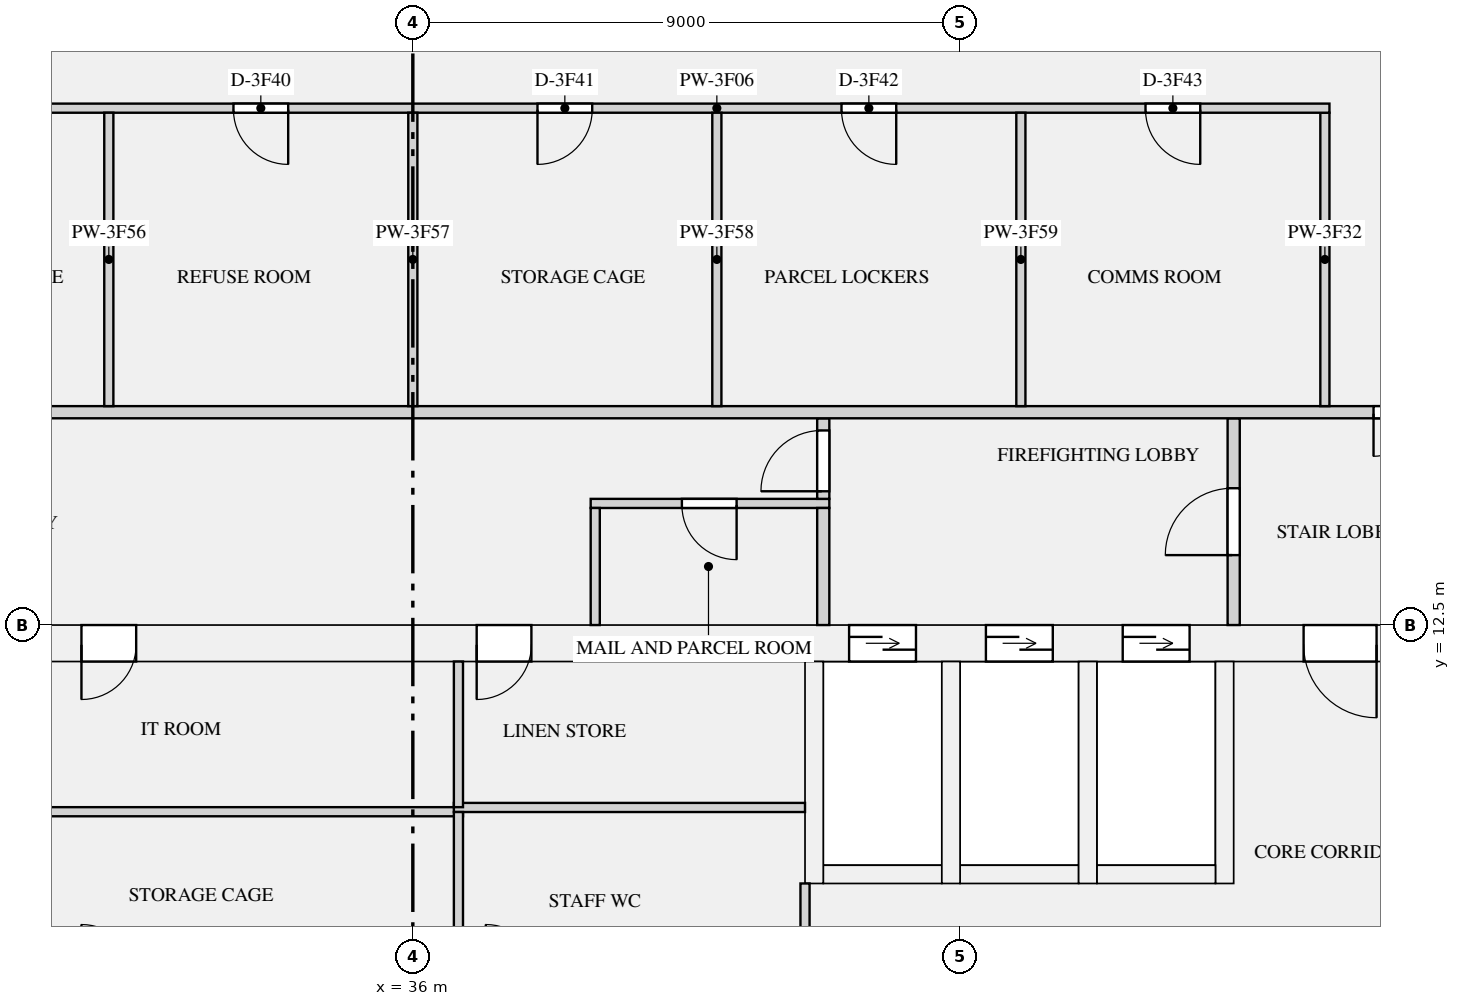
"""IFC4 building model, lengths in metres.
Left out: names, types, materials, properties, quantities, classifications, styles, units other than length and angle.
Written with IfcOpenShell. Run it as: python <this file> out.ifc"""

import sys

from ifc_helpers import new_model, si_unit, direction, frame, frame_2d, origin, place, context, subcontext, project, spatial, rectangle, extrude, element, fill, save


model = new_model("IFC4")
c1 = context("Model", 3, precision=1e-05, world=origin(), true_north=direction((0.0, 1.0)))
c2 = subcontext(c1, "Body", "Model", "MODEL_VIEW")
j1 = project(units=[si_unit("LENGTHUNIT", "METRE"), si_unit("PLANEANGLEUNIT", "RADIAN")], contexts=[c1])
p1 = place(None, origin())
s1 = spatial("IfcSite", under=j1, at=p1, CompositionType="ELEMENT")
p2 = place(p1, origin())
s2 = spatial("IfcBuilding", under=s1, at=p2, CompositionType="ELEMENT")
p3 = place(p2, frame((0.0, 0.0, 179.1)))
s3 = spatial("IfcBuildingStorey", under=s2, at=p3, CompositionType="ELEMENT", Elevation=179.1)
p4 = place(p3, frame((18.7, 12.2, 0.0), z_axis=(0.0, 0.0, 1.0), x_axis=(1.0, 0.0, 0.0)))
e1 = element("IfcWall", 1, at=p4, inside=s3, PredefinedType="SHEAR", context=c2, shape_type="SweptSolid", body=[
    extrude(rectangle(XDim=34.6, YDim=0.6, at=frame_2d((17.3, 0.0))), origin(), (0.0, 0.0, 1.0), 3.15),
])
p5 = place(p4, frame((24.475, 0.0, 0.0)))
e2 = element("IfcOpeningElement", 2, at=p5, cuts=e1, PredefinedType="OPENING", context=c2, shape_type="SweptSolid", body=[
    extrude(rectangle(XDim=1.1, YDim=2.1, at=frame_2d((0.55, 1.05))), frame((0.0, 0.31, 0.0), z_axis=(0.0, -1.0, 0.0), x_axis=(1.0, 0.0, 0.0)), (0.0, 0.0, 1.0), 0.62),
])
p6 = place(p4, frame((26.725, 0.0, 0.0)))
e3 = element("IfcOpeningElement", 3, at=p6, cuts=e1, PredefinedType="OPENING", context=c2, shape_type="SweptSolid", body=[
    extrude(rectangle(XDim=1.1, YDim=2.1, at=frame_2d((0.55, 1.05))), frame((0.0, 0.31, 0.0), z_axis=(0.0, -1.0, 0.0), x_axis=(1.0, 0.0, 0.0)), (0.0, 0.0, 1.0), 0.62),
])
p7 = place(p4, frame((28.975, 0.0, 0.0)))
e4 = element("IfcOpeningElement", 4, at=p7, cuts=e1, PredefinedType="OPENING", context=c2, shape_type="SweptSolid", body=[
    extrude(rectangle(XDim=1.1, YDim=2.1, at=frame_2d((0.55, 1.05))), frame((0.0, 0.31, 0.0), z_axis=(0.0, -1.0, 0.0), x_axis=(1.0, 0.0, 0.0)), (0.0, 0.0, 1.0), 0.62),
])
p8 = place(p4, frame((4.85, 0.0, 0.0)))
e5 = element("IfcOpeningElement", 5, at=p8, cuts=e1, PredefinedType="OPENING", context=c2, shape_type="SweptSolid", body=[
    extrude(rectangle(XDim=0.9, YDim=2.1, at=frame_2d((0.45, 1.05))), frame((0.0, 0.31, 0.0), z_axis=(0.0, -1.0, 0.0), x_axis=(1.0, 0.0, 0.0)), (0.0, 0.0, 1.0), 0.62),
])
p9 = place(p4, frame((11.85, 0.0, 0.0)))
e6 = element("IfcOpeningElement", 6, at=p9, cuts=e1, PredefinedType="OPENING", context=c2, shape_type="SweptSolid", body=[
    extrude(rectangle(XDim=0.9, YDim=2.1, at=frame_2d((0.45, 1.05))), frame((0.0, 0.31, 0.0), z_axis=(0.0, -1.0, 0.0), x_axis=(1.0, 0.0, 0.0)), (0.0, 0.0, 1.0), 0.62),
])
p10 = place(p4, frame((18.35, 0.0, 0.0)))
e7 = element("IfcOpeningElement", 7, at=p10, cuts=e1, PredefinedType="OPENING", context=c2, shape_type="SweptSolid", body=[
    extrude(rectangle(XDim=0.9, YDim=2.1, at=frame_2d((0.45, 1.05))), frame((0.0, 0.31, 0.0), z_axis=(0.0, -1.0, 0.0), x_axis=(1.0, 0.0, 0.0)), (0.0, 0.0, 1.0), 0.62),
])
p11 = place(p4, frame((1.45, 0.0, 0.0)))
e8 = element("IfcOpeningElement", 8, at=p11, cuts=e1, PredefinedType="OPENING", context=c2, shape_type="SweptSolid", body=[
    extrude(rectangle(XDim=1.2, YDim=2.1, at=frame_2d((0.6, 1.05))), frame((0.0, 0.31, 0.0), z_axis=(0.0, -1.0, 0.0), x_axis=(1.0, 0.0, 0.0)), (0.0, 0.0, 1.0), 0.62),
])
p12 = place(p4, frame((31.95, 0.0, 0.0)))
e9 = element("IfcOpeningElement", 9, at=p12, cuts=e1, PredefinedType="OPENING", context=c2, shape_type="SweptSolid", body=[
    extrude(rectangle(XDim=1.2, YDim=2.1, at=frame_2d((0.6, 1.05))), frame((0.0, 0.31, 0.0), z_axis=(0.0, -1.0, 0.0), x_axis=(1.0, 0.0, 0.0)), (0.0, 0.0, 1.0), 0.62),
])
p13 = place(p3, frame((42.75, 8.4, 0.0), z_axis=(0.0, 0.0, 1.0), x_axis=(1.0, 0.0, 0.0)))
e10 = element("IfcWall", 10, at=p13, inside=s3, PredefinedType="SHEAR", context=c2, shape_type="SweptSolid", body=[
    extrude(rectangle(XDim=1.95, YDim=0.3, at=frame_2d((0.975, 0.0))), origin(), (0.0, 0.0, 1.0), 3.15),
])
p14 = place(p3, frame((42.6, 8.25, 0.0), z_axis=(0.0, 0.0, 1.0), x_axis=(0.0, 1.0, 0.0)))
e11 = element("IfcWall", 11, at=p14, inside=s3, PredefinedType="SHEAR", context=c2, shape_type="SweptSolid", body=[
    extrude(rectangle(XDim=3.65, YDim=0.3, at=frame_2d((1.825, 0.0))), origin(), (0.0, 0.0, 1.0), 3.15),
])
p15 = place(p3, frame((45.0, 8.4, 0.0), z_axis=(0.0, 0.0, 1.0), x_axis=(1.0, 0.0, 0.0)))
e12 = element("IfcWall", 12, at=p15, inside=s3, PredefinedType="SHEAR", context=c2, shape_type="SweptSolid", body=[
    extrude(rectangle(XDim=1.95, YDim=0.3, at=frame_2d((0.975, 0.0))), origin(), (0.0, 0.0, 1.0), 3.15),
])
p16 = place(p3, frame((44.85, 8.25, 0.0), z_axis=(0.0, 0.0, 1.0), x_axis=(0.0, 1.0, 0.0)))
e13 = element("IfcWall", 13, at=p16, inside=s3, PredefinedType="SHEAR", context=c2, shape_type="SweptSolid", body=[
    extrude(rectangle(XDim=3.65, YDim=0.3, at=frame_2d((1.825, 0.0))), origin(), (0.0, 0.0, 1.0), 3.15),
])
p17 = place(p3, frame((47.25, 8.4, 0.0), z_axis=(0.0, 0.0, 1.0), x_axis=(1.0, 0.0, 0.0)))
e14 = element("IfcWall", 14, at=p17, inside=s3, PredefinedType="SHEAR", context=c2, shape_type="SweptSolid", body=[
    extrude(rectangle(XDim=1.95, YDim=0.3, at=frame_2d((0.975, 0.0))), origin(), (0.0, 0.0, 1.0), 3.15),
])
for number, where, z_axis, x_axis in (
    (15, (47.1, 8.25, 0.0), (0.0, 0.0, 1.0), (0.0, 1.0, 0.0)),
    (16, (49.35, 8.25, 0.0), (0.0, 0.0, 1.0), (0.0, 1.0, 0.0)),
):
    element("IfcWall", number, at=place(p3, frame(where, z_axis=z_axis, x_axis=x_axis)), inside=s3, PredefinedType="SHEAR", context=c2, shape_type="SweptSolid", body=[
        extrude(rectangle(XDim=3.65, YDim=0.3, at=frame_2d((1.825, 0.0))), origin(), (0.0, 0.0, 1.0), 3.15),
    ])
p18 = place(p3, frame((22.725, 9.43, 0.0), z_axis=(0.0, 0.0, 1.0), x_axis=(1.0, 0.0, 0.0)))
e17 = element("IfcWall", 17, at=p18, inside=s3, PredefinedType="PARTITIONING", context=c2, shape_type="SweptSolid", body=[
    extrude(rectangle(XDim=14.1, YDim=0.15, at=frame_2d((7.05, 0.0))), origin(), (0.0, 0.0, 1.0), 2.83),
])
p19 = place(p3, frame((36.675, 9.5, 0.0), z_axis=(0.0, 0.0, 1.0), x_axis=(1.0, 0.0, 0.0)))
e18 = element("IfcWall", 18, at=p19, inside=s3, PredefinedType="PARTITIONING", context=c2, shape_type="SweptSolid", body=[
    extrude(rectangle(XDim=5.775, YDim=0.15, at=frame_2d((2.887, 0.0))), origin(), (0.0, 0.0, 1.0), 2.83),
])
p20 = place(p3, frame((38.925, 14.5, 0.0), z_axis=(0.0, 0.0, 1.0), x_axis=(1.0, 0.0, 0.0)))
e19 = element("IfcWall", 19, at=p20, inside=s3, PredefinedType="PARTITIONING", context=c2, shape_type="SweptSolid", body=[
    extrude(rectangle(XDim=3.925, YDim=0.15, at=frame_2d((1.962, 0.0))), origin(), (0.0, 0.0, 1.0), 2.83),
])
p21 = place(p20, frame((1.5, 0.0, 0.0)))
e20 = element("IfcOpeningElement", 20, at=p21, cuts=e19, PredefinedType="OPENING", context=c2, shape_type="SweptSolid", body=[
    extrude(rectangle(XDim=0.9, YDim=2.1, at=frame_2d((0.45, 1.05))), frame((0.0, 0.085, 0.0), z_axis=(0.0, -1.0, 0.0), x_axis=(1.0, 0.0, 0.0)), (0.0, 0.0, 1.0), 0.17),
])
p22 = place(p3, frame((42.45, 6.65, 0.0), z_axis=(0.0, 0.0, 1.0), x_axis=(0.0, 1.0, 0.0)))
e21 = element("IfcWall", 21, at=p22, inside=s3, PredefinedType="PARTITIONING", context=c2, shape_type="SweptSolid", body=[
    extrude(rectangle(XDim=1.6, YDim=0.15, at=frame_2d((0.8, 0.0))), origin(), (0.0, 0.0, 1.0), 2.83),
])
p23 = place(p3, frame((36.75, 6.725, 0.0), z_axis=(0.0, 0.0, 1.0), x_axis=(0.0, 1.0, 0.0)))
e22 = element("IfcWall", 22, at=p23, inside=s3, PredefinedType="PARTITIONING", context=c2, shape_type="SweptSolid", body=[
    extrude(rectangle(XDim=2.7, YDim=0.15, at=frame_2d((1.35, 0.0))), origin(), (0.0, 0.0, 1.0), 2.83),
])
p24 = place(p3, frame((36.75, 9.505, 0.0), z_axis=(0.0, 0.0, 1.0), x_axis=(0.0, 1.0, 0.0)))
e23 = element("IfcWall", 23, at=p24, inside=s3, PredefinedType="PARTITIONING", context=c2, shape_type="SweptSolid", body=[
    extrude(rectangle(XDim=2.395, YDim=0.15, at=frame_2d((1.198, 0.0))), origin(), (0.0, 0.0, 1.0), 2.83),
])
p25 = place(p3, frame((39.0, 12.5, 0.0), z_axis=(0.0, 0.0, 1.0), x_axis=(0.0, 1.0, 0.0)))
e24 = element("IfcWall", 24, at=p25, inside=s3, PredefinedType="PARTITIONING", context=c2, shape_type="SweptSolid", body=[
    extrude(rectangle(XDim=1.925, YDim=0.15, at=frame_2d((0.962, 0.0))), origin(), (0.0, 0.0, 1.0), 2.83),
])
p26 = place(p3, frame((42.75, 12.5, 0.0), z_axis=(0.0, 0.0, 1.0), x_axis=(0.0, 1.0, 0.0)))
e25 = element("IfcWall", 25, at=p26, inside=s3, PredefinedType="PARTITIONING", context=c2, shape_type="SweptSolid", body=[
    extrude(rectangle(XDim=1.925, YDim=0.2, at=frame_2d((0.962, 0.0))), origin(), (0.0, 0.0, 1.0), 2.83),
])
p27 = place(p3, frame((49.5, 12.5, 0.0), z_axis=(0.0, 0.0, 1.0), x_axis=(0.0, 1.0, 0.0)))
e26 = element("IfcWall", 26, at=p27, inside=s3, PredefinedType="PARTITIONING", context=c2, shape_type="SweptSolid", body=[
    extrude(rectangle(XDim=3.4, YDim=0.2, at=frame_2d((1.7, 0.0))), origin(), (0.0, 0.0, 1.0), 2.83),
])
p28 = place(p27, frame((1.15, 0.0, 0.0)))
e27 = element("IfcOpeningElement", 27, at=p28, cuts=e26, PredefinedType="OPENING", context=c2, shape_type="SweptSolid", body=[
    extrude(rectangle(XDim=1.1, YDim=2.1, at=frame_2d((0.55, 1.05))), frame((0.0, 0.11, 0.0), z_axis=(0.0, -1.0, 0.0), x_axis=(1.0, 0.0, 0.0)), (0.0, 0.0, 1.0), 0.22),
])
p29 = place(p3, frame((42.75, 14.575, 0.0), z_axis=(0.0, 0.0, 1.0), x_axis=(0.0, 1.0, 0.0)))
e28 = element("IfcWall", 28, at=p29, inside=s3, PredefinedType="PARTITIONING", context=c2, shape_type="SweptSolid", body=[
    extrude(rectangle(XDim=1.325, YDim=0.2, at=frame_2d((0.663, 0.0))), origin(), (0.0, 0.0, 1.0), 2.83),
])
p30 = place(p29, frame((0.125, 0.0, 0.0)))
e29 = element("IfcOpeningElement", 29, at=p30, cuts=e28, PredefinedType="OPENING", context=c2, shape_type="SweptSolid", body=[
    extrude(rectangle(XDim=1.0, YDim=2.1, at=frame_2d((0.5, 1.05))), frame((0.0, 0.11, 0.0), z_axis=(0.0, -1.0, 0.0), x_axis=(1.0, 0.0, 0.0)), (0.0, 0.0, 1.0), 0.22),
])
p31 = place(p3, frame((20.925, 21.0, 0.0), z_axis=(0.0, 0.0, 1.0), x_axis=(1.0, 0.0, 0.0)))
e30 = element("IfcWall", 30, at=p31, inside=s3, PredefinedType="PARTITIONING", context=c2, shape_type="SweptSolid", body=[
    extrude(rectangle(XDim=30.15, YDim=0.15, at=frame_2d((15.075, 0.0))), origin(), (0.0, 0.0, 1.0), 2.83),
])
p32 = place(p31, frame((2.125, 0.0, 0.0)))
e31 = element("IfcOpeningElement", 31, at=p32, cuts=e30, PredefinedType="OPENING", context=c2, shape_type="SweptSolid", body=[
    extrude(rectangle(XDim=0.9, YDim=2.1, at=frame_2d((0.45, 1.05))), frame((0.0, 0.085, 0.0), z_axis=(0.0, -1.0, 0.0), x_axis=(1.0, 0.0, 0.0)), (0.0, 0.0, 1.0), 0.17),
])
p33 = place(p31, frame((7.125, 0.0, 0.0)))
e32 = element("IfcOpeningElement", 32, at=p33, cuts=e30, PredefinedType="OPENING", context=c2, shape_type="SweptSolid", body=[
    extrude(rectangle(XDim=0.9, YDim=2.1, at=frame_2d((0.45, 1.05))), frame((0.0, 0.085, 0.0), z_axis=(0.0, -1.0, 0.0), x_axis=(1.0, 0.0, 0.0)), (0.0, 0.0, 1.0), 0.17),
])
p34 = place(p31, frame((12.125, 0.0, 0.0)))
e33 = element("IfcOpeningElement", 33, at=p34, cuts=e30, PredefinedType="OPENING", context=c2, shape_type="SweptSolid", body=[
    extrude(rectangle(XDim=0.9, YDim=2.1, at=frame_2d((0.45, 1.05))), frame((0.0, 0.085, 0.0), z_axis=(0.0, -1.0, 0.0), x_axis=(1.0, 0.0, 0.0)), (0.0, 0.0, 1.0), 0.17),
])
p35 = place(p31, frame((17.125, 0.0, 0.0)))
e34 = element("IfcOpeningElement", 34, at=p35, cuts=e30, PredefinedType="OPENING", context=c2, shape_type="SweptSolid", body=[
    extrude(rectangle(XDim=0.9, YDim=2.1, at=frame_2d((0.45, 1.05))), frame((0.0, 0.085, 0.0), z_axis=(0.0, -1.0, 0.0), x_axis=(1.0, 0.0, 0.0)), (0.0, 0.0, 1.0), 0.17),
])
p36 = place(p31, frame((22.125, 0.0, 0.0)))
e35 = element("IfcOpeningElement", 35, at=p36, cuts=e30, PredefinedType="OPENING", context=c2, shape_type="SweptSolid", body=[
    extrude(rectangle(XDim=0.9, YDim=2.1, at=frame_2d((0.45, 1.05))), frame((0.0, 0.085, 0.0), z_axis=(0.0, -1.0, 0.0), x_axis=(1.0, 0.0, 0.0)), (0.0, 0.0, 1.0), 0.17),
])
p37 = place(p31, frame((27.125, 0.0, 0.0)))
e36 = element("IfcOpeningElement", 36, at=p37, cuts=e30, PredefinedType="OPENING", context=c2, shape_type="SweptSolid", body=[
    extrude(rectangle(XDim=0.9, YDim=2.1, at=frame_2d((0.45, 1.05))), frame((0.0, 0.085, 0.0), z_axis=(0.0, -1.0, 0.0), x_axis=(1.0, 0.0, 0.0)), (0.0, 0.0, 1.0), 0.17),
])
p38 = place(p3, frame((17.9, 16.0, 0.0), z_axis=(0.0, 0.0, 1.0), x_axis=(1.0, 0.0, 0.0)))
e37 = element("IfcWall", 37, at=p38, inside=s3, PredefinedType="PARTITIONING", context=c2, shape_type="SweptSolid", body=[
    extrude(rectangle(XDim=36.2, YDim=0.2, at=frame_2d((18.1, 0.0))), origin(), (0.0, 0.0, 1.0), 2.83),
])
p39 = place(p38, frame((0.9, 0.0, 0.0)))
e38 = element("IfcOpeningElement", 38, at=p39, cuts=e37, PredefinedType="OPENING", context=c2, shape_type="SweptSolid", body=[
    extrude(rectangle(XDim=1.4, YDim=2.1, at=frame_2d((0.7, 1.05))), frame((0.0, 0.11, 0.0), z_axis=(0.0, -1.0, 0.0), x_axis=(1.0, 0.0, 0.0)), (0.0, 0.0, 1.0), 0.22),
])
p40 = place(p38, frame((33.9, 0.0, 0.0)))
e39 = element("IfcOpeningElement", 39, at=p40, cuts=e37, PredefinedType="OPENING", context=c2, shape_type="SweptSolid", body=[
    extrude(rectangle(XDim=1.4, YDim=2.1, at=frame_2d((0.7, 1.05))), frame((0.0, 0.11, 0.0), z_axis=(0.0, -1.0, 0.0), x_axis=(1.0, 0.0, 0.0)), (0.0, 0.0, 1.0), 0.22),
])
for number, where, z_axis, x_axis in (
    (40, (51.0, 16.1, 0.0), (0.0, 0.0, 1.0), (0.0, 1.0, 0.0)),
    (41, (31.0, 16.1, 0.0), (0.0, 0.0, 1.0), (0.0, 1.0, 0.0)),
    (42, (36.0, 16.1, 0.0), (0.0, 0.0, 1.0), (0.0, 1.0, 0.0)),
    (43, (41.0, 16.1, 0.0), (0.0, 0.0, 1.0), (0.0, 1.0, 0.0)),
    (44, (46.0, 16.1, 0.0), (0.0, 0.0, 1.0), (0.0, 1.0, 0.0)),
):
    element("IfcWall", number, at=place(p3, frame(where, z_axis=z_axis, x_axis=x_axis)), inside=s3, PredefinedType="PARTITIONING", context=c2, shape_type="SweptSolid", body=[
        extrude(rectangle(XDim=4.825, YDim=0.15, at=frame_2d((2.413, 0.0))), origin(), (0.0, 0.0, 1.0), 2.83),
    ])
p41 = place(p5, origin())
e45 = element("IfcDoor", 45, at=p41, inside=s3, OperationType="DOUBLE_DOOR_SLIDING", PredefinedType="DOOR", context=c2, shape_type="SweptSolid", body=[
    extrude(rectangle(XDim=1.1, YDim=2.1, at=frame_2d((0.55, 1.05))), frame((0.0, 0.025, 0.0), z_axis=(0.0, -1.0, 0.0), x_axis=(1.0, 0.0, 0.0)), (0.0, 0.0, 1.0), 0.05),
])
fill(e2, e45)
p42 = place(p6, origin())
e46 = element("IfcDoor", 46, at=p42, inside=s3, OperationType="DOUBLE_DOOR_SLIDING", PredefinedType="DOOR", context=c2, shape_type="SweptSolid", body=[
    extrude(rectangle(XDim=1.1, YDim=2.1, at=frame_2d((0.55, 1.05))), frame((0.0, 0.025, 0.0), z_axis=(0.0, -1.0, 0.0), x_axis=(1.0, 0.0, 0.0)), (0.0, 0.0, 1.0), 0.05),
])
fill(e3, e46)
p43 = place(p7, origin())
e47 = element("IfcDoor", 47, at=p43, inside=s3, OperationType="DOUBLE_DOOR_SLIDING", PredefinedType="DOOR", context=c2, shape_type="SweptSolid", body=[
    extrude(rectangle(XDim=1.1, YDim=2.1, at=frame_2d((0.55, 1.05))), frame((0.0, 0.025, 0.0), z_axis=(0.0, -1.0, 0.0), x_axis=(1.0, 0.0, 0.0)), (0.0, 0.0, 1.0), 0.05),
])
fill(e4, e47)
p44 = place(p21, frame((0.9, 0.0, 0.0), z_axis=(0.0, 0.0, 1.0), x_axis=(-1.0, 0.0, 0.0)))
e48 = element("IfcDoor", 48, at=p44, inside=s3, OperationType="SINGLE_SWING_LEFT", PredefinedType="DOOR", context=c2, shape_type="SweptSolid", body=[
    extrude(rectangle(XDim=0.9, YDim=2.1, at=frame_2d((0.45, 1.05))), frame((0.0, 0.025, 0.0), z_axis=(0.0, -1.0, 0.0), x_axis=(1.0, 0.0, 0.0)), (0.0, 0.0, 1.0), 0.05),
])
fill(e20, e48)
p45 = place(p9, frame((0.9, 0.0, 0.0), z_axis=(0.0, 0.0, 1.0), x_axis=(-1.0, 0.0, 0.0)))
e49 = element("IfcDoor", 49, at=p45, inside=s3, OperationType="SINGLE_SWING_RIGHT", PredefinedType="DOOR", context=c2, shape_type="SweptSolid", body=[
    extrude(rectangle(XDim=0.9, YDim=2.1, at=frame_2d((0.45, 1.05))), frame((0.0, 0.025, 0.0), z_axis=(0.0, -1.0, 0.0), x_axis=(1.0, 0.0, 0.0)), (0.0, 0.0, 1.0), 0.05),
])
fill(e6, e49)
p46 = place(p10, frame((0.9, 0.0, 0.0), z_axis=(0.0, 0.0, 1.0), x_axis=(-1.0, 0.0, 0.0)))
e50 = element("IfcDoor", 50, at=p46, inside=s3, OperationType="SINGLE_SWING_RIGHT", PredefinedType="DOOR", context=c2, shape_type="SweptSolid", body=[
    extrude(rectangle(XDim=0.9, YDim=2.1, at=frame_2d((0.45, 1.05))), frame((0.0, 0.025, 0.0), z_axis=(0.0, -1.0, 0.0), x_axis=(1.0, 0.0, 0.0)), (0.0, 0.0, 1.0), 0.05),
])
fill(e7, e50)
p47 = place(p12, frame((1.2, 0.0, 0.0), z_axis=(0.0, 0.0, 1.0), x_axis=(-1.0, 0.0, 0.0)))
e51 = element("IfcDoor", 51, at=p47, inside=s3, OperationType="SINGLE_SWING_LEFT", PredefinedType="DOOR", context=c2, shape_type="SweptSolid", body=[
    extrude(rectangle(XDim=1.2, YDim=2.1, at=frame_2d((0.6, 1.05))), frame((0.0, 0.025, 0.0), z_axis=(0.0, -1.0, 0.0), x_axis=(1.0, 0.0, 0.0)), (0.0, 0.0, 1.0), 0.05),
])
fill(e9, e51)
p48 = place(p30, origin())
e52 = element("IfcDoor", 52, at=p48, inside=s3, OperationType="SINGLE_SWING_LEFT", PredefinedType="DOOR", context=c2, shape_type="SweptSolid", body=[
    extrude(rectangle(XDim=1.0, YDim=2.1, at=frame_2d((0.5, 1.05))), frame((0.0, 0.025, 0.0), z_axis=(0.0, -1.0, 0.0), x_axis=(1.0, 0.0, 0.0)), (0.0, 0.0, 1.0), 0.05),
])
fill(e29, e52)
p49 = place(p28, origin())
e53 = element("IfcDoor", 53, at=p49, inside=s3, OperationType="SINGLE_SWING_LEFT", PredefinedType="DOOR", context=c2, shape_type="SweptSolid", body=[
    extrude(rectangle(XDim=1.1, YDim=2.1, at=frame_2d((0.55, 1.05))), frame((0.0, 0.025, 0.0), z_axis=(0.0, -1.0, 0.0), x_axis=(1.0, 0.0, 0.0)), (0.0, 0.0, 1.0), 0.05),
])
fill(e27, e53)
p50 = place(p40, frame((1.4, 0.0, 0.0), z_axis=(0.0, 0.0, 1.0), x_axis=(-1.0, 0.0, 0.0)))
e54 = element("IfcDoor", 54, at=p50, inside=s3, OperationType="DOUBLE_DOOR_SINGLE_SWING", PredefinedType="DOOR", context=c2, shape_type="SweptSolid", body=[
    extrude(rectangle(XDim=1.4, YDim=2.1, at=frame_2d((0.7, 1.05))), frame((0.0, 0.025, 0.0), z_axis=(0.0, -1.0, 0.0), x_axis=(1.0, 0.0, 0.0)), (0.0, 0.0, 1.0), 0.05),
])
fill(e39, e54)
p51 = place(p34, frame((0.9, 0.0, 0.0), z_axis=(0.0, 0.0, 1.0), x_axis=(-1.0, 0.0, 0.0)))
e55 = element("IfcDoor", 55, at=p51, inside=s3, OperationType="SINGLE_SWING_LEFT", PredefinedType="DOOR", context=c2, shape_type="SweptSolid", body=[
    extrude(rectangle(XDim=0.9, YDim=2.1, at=frame_2d((0.45, 1.05))), frame((0.0, 0.025, 0.0), z_axis=(0.0, -1.0, 0.0), x_axis=(1.0, 0.0, 0.0)), (0.0, 0.0, 1.0), 0.05),
])
fill(e33, e55)
p52 = place(p35, frame((0.9, 0.0, 0.0), z_axis=(0.0, 0.0, 1.0), x_axis=(-1.0, 0.0, 0.0)))
e56 = element("IfcDoor", 56, at=p52, inside=s3, OperationType="SINGLE_SWING_RIGHT", PredefinedType="DOOR", context=c2, shape_type="SweptSolid", body=[
    extrude(rectangle(XDim=0.9, YDim=2.1, at=frame_2d((0.45, 1.05))), frame((0.0, 0.025, 0.0), z_axis=(0.0, -1.0, 0.0), x_axis=(1.0, 0.0, 0.0)), (0.0, 0.0, 1.0), 0.05),
])
fill(e34, e56)
p53 = place(p36, frame((0.9, 0.0, 0.0), z_axis=(0.0, 0.0, 1.0), x_axis=(-1.0, 0.0, 0.0)))
e57 = element("IfcDoor", 57, at=p53, inside=s3, OperationType="SINGLE_SWING_LEFT", PredefinedType="DOOR", context=c2, shape_type="SweptSolid", body=[
    extrude(rectangle(XDim=0.9, YDim=2.1, at=frame_2d((0.45, 1.05))), frame((0.0, 0.025, 0.0), z_axis=(0.0, -1.0, 0.0), x_axis=(1.0, 0.0, 0.0)), (0.0, 0.0, 1.0), 0.05),
])
fill(e35, e57)
p54 = place(p37, frame((0.9, 0.0, 0.0), z_axis=(0.0, 0.0, 1.0), x_axis=(-1.0, 0.0, 0.0)))
e58 = element("IfcDoor", 58, at=p54, inside=s3, OperationType="SINGLE_SWING_LEFT", PredefinedType="DOOR", context=c2, shape_type="SweptSolid", body=[
    extrude(rectangle(XDim=0.9, YDim=2.1, at=frame_2d((0.45, 1.05))), frame((0.0, 0.025, 0.0), z_axis=(0.0, -1.0, 0.0), x_axis=(1.0, 0.0, 0.0)), (0.0, 0.0, 1.0), 0.05),
])
fill(e36, e58)
save(model, sys.argv[1])
